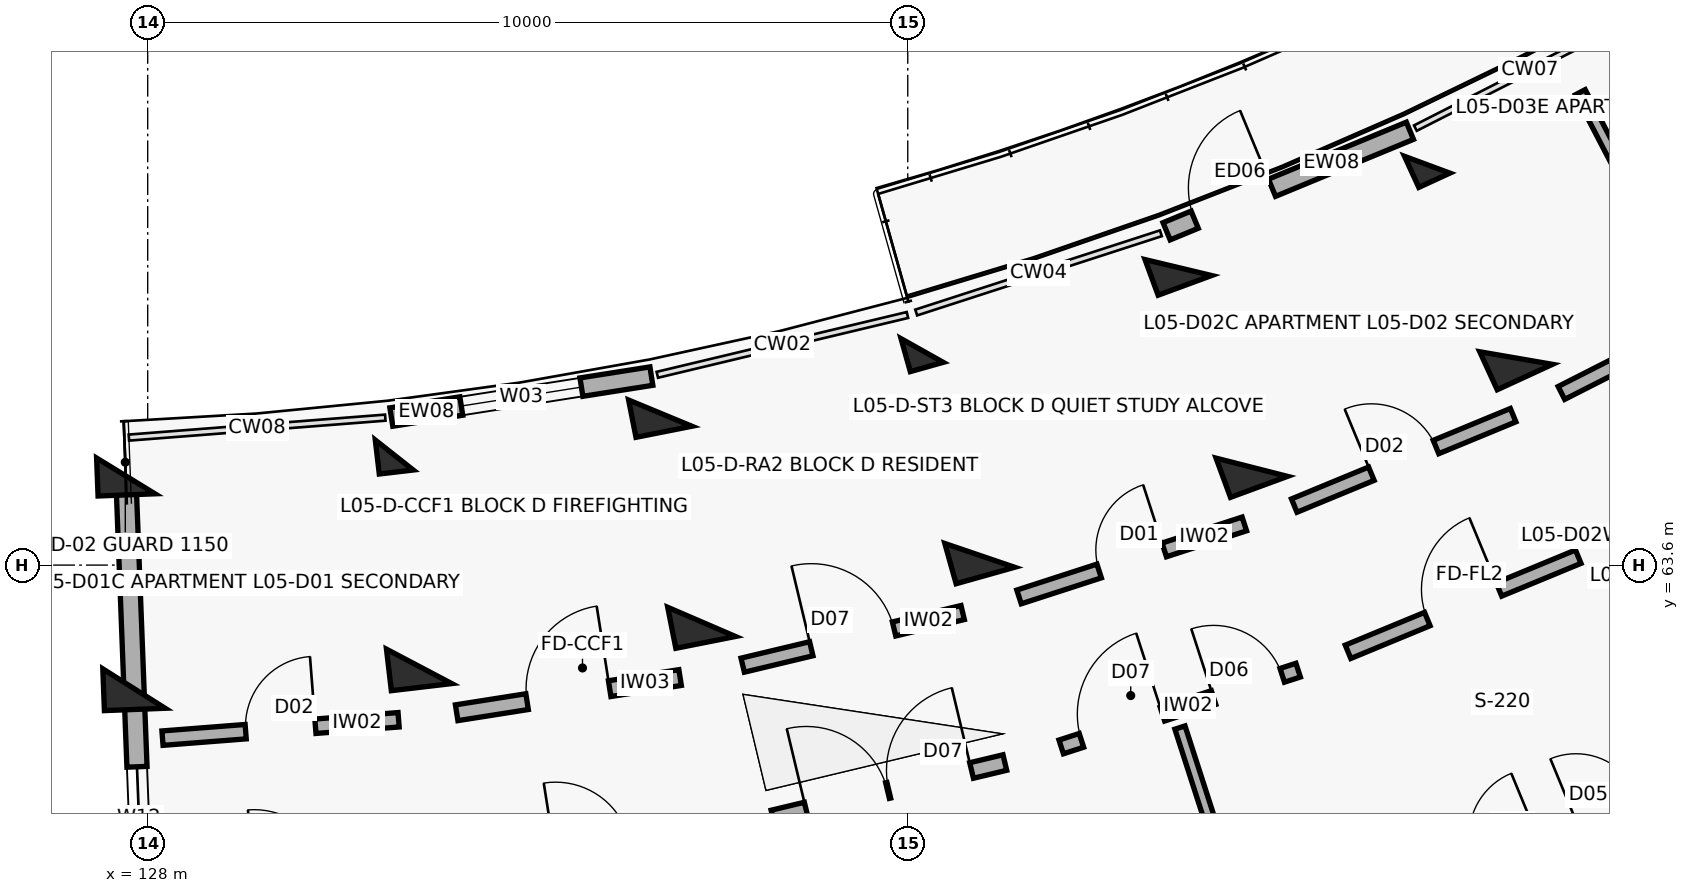
"""IFC4 building model, lengths in metres.
Left out: names, types, materials, properties, quantities, classifications, styles, units other than length and angle.
Written with IfcOpenShell. Run it as: python <this file> out.ifc"""

import sys

from ifc_helpers import new_model, si_unit, direction, frame, frame_2d, origin, origin_2d, place, context, subcontext, project, spatial, rectangle, extrude, element, fill, save


model = new_model("IFC4")
c1 = context("Model", 3, precision=1e-05, world=origin(), true_north=direction((0.0, 1.0)))
c2 = subcontext(c1, "Body", "Model", "MODEL_VIEW")
j1 = project(units=[si_unit("LENGTHUNIT", "METRE"), si_unit("PLANEANGLEUNIT", "RADIAN")], contexts=[c1])
p1 = place(None, origin())
s1 = spatial("IfcSite", under=j1, at=p1, CompositionType="ELEMENT")
p2 = place(p1, origin())
s2 = spatial("IfcBuilding", under=s1, at=p2, CompositionType="ELEMENT")
p3 = place(p2, frame((0.0, 0.0, 17.4)))
s3 = spatial("IfcBuildingStorey", under=s2, at=p3, CompositionType="ELEMENT", Elevation=17.4)
p4 = place(p3, frame((127.712, 64.773, 0.0), z_axis=(0.0, 0.0, 1.0), x_axis=(0.038387809088, -0.999262916411, 0.0)))
e1 = element("IfcColumn", 1, at=p4, inside=s3, PredefinedType="COLUMN", context=c2, shape_type="SweptSolid", body=[
    extrude(rectangle(XDim=0.5, YDim=0.75, at=origin_2d()), origin(), (0.0, 0.0, 1.0), 3.1),
])
p5 = place(p3, frame((127.82, 61.975, 0.0), z_axis=(0.0, 0.0, 1.0), x_axis=(0.038387809088, -0.999262916411, 0.0)))
e2 = element("IfcColumn", 2, at=p5, inside=s3, PredefinedType="COLUMN", context=c2, shape_type="SweptSolid", body=[
    extrude(rectangle(XDim=0.55, YDim=0.8, at=origin_2d()), origin(), (0.0, 0.0, 1.0), 3.1),
])
p6 = place(p3, frame((131.244, 65.048, 0.0), z_axis=(0.0, 0.0, 1.0), x_axis=(0.116670737099, -0.993170649538, 0.0)))
e3 = element("IfcColumn", 3, at=p6, inside=s3, PredefinedType="COLUMN", context=c2, shape_type="SweptSolid", body=[
    extrude(rectangle(XDim=0.45, YDim=0.45, at=origin_2d()), origin(), (0.0, 0.0, 1.0), 3.1),
])
p7 = place(p3, frame((131.571, 62.267, 0.0), z_axis=(0.0, 0.0, 1.0), x_axis=(0.116670737099, -0.993170649538, 0.0)))
e4 = element("IfcColumn", 4, at=p7, inside=s3, PredefinedType="COLUMN", context=c2, shape_type="SweptSolid", body=[
    extrude(rectangle(XDim=0.55, YDim=0.8, at=origin_2d()), origin(), (0.0, 0.0, 1.0), 3.1),
])
p8 = place(p3, frame((134.744, 65.599, 0.0), z_axis=(0.0, 0.0, 1.0), x_axis=(0.19423435122, -0.980955155349, 0.0)))
e5 = element("IfcColumn", 5, at=p8, inside=s3, PredefinedType="COLUMN", context=c2, shape_type="SweptSolid", body=[
    extrude(rectangle(XDim=0.5, YDim=0.75, at=origin_2d()), origin(), (0.0, 0.0, 1.0), 3.1),
])
p9 = place(p3, frame((135.288, 62.853, 0.0), z_axis=(0.0, 0.0, 1.0), x_axis=(0.19423435122, -0.980955155349, 0.0)))
e6 = element("IfcColumn", 6, at=p9, inside=s3, PredefinedType="COLUMN", context=c2, shape_type="SweptSolid", body=[
    extrude(rectangle(XDim=0.55, YDim=0.8, at=origin_2d()), origin(), (0.0, 0.0, 1.0), 3.1),
])
p10 = place(p3, frame((138.189, 66.423, 0.0), z_axis=(0.0, 0.0, 1.0), x_axis=(0.270600445976, -0.962691746426, 0.0)))
e7 = element("IfcColumn", 7, at=p10, inside=s3, PredefinedType="COLUMN", context=c2, shape_type="SweptSolid", body=[
    extrude(rectangle(XDim=0.45, YDim=0.45, at=origin_2d()), origin(), (0.0, 0.0, 1.0), 3.1),
])
p11 = place(p3, frame((138.947, 63.728, 0.0), z_axis=(0.0, 0.0, 1.0), x_axis=(0.270600445976, -0.962691746426, 0.0)))
e8 = element("IfcColumn", 8, at=p11, inside=s3, PredefinedType="COLUMN", context=c2, shape_type="SweptSolid", body=[
    extrude(rectangle(XDim=0.55, YDim=0.8, at=origin_2d()), origin(), (0.0, 0.0, 1.0), 3.1),
])
p12 = place(p3, frame((141.56, 67.515, 0.0), z_axis=(0.0, 0.0, 1.0), x_axis=(0.345298198999, -0.93849302276, 0.0)))
e9 = element("IfcColumn", 9, at=p12, inside=s3, PredefinedType="COLUMN", context=c2, shape_type="SweptSolid", body=[
    extrude(rectangle(XDim=0.5, YDim=0.75, at=origin_2d()), origin(), (0.0, 0.0, 1.0), 3.1),
])
p13 = place(p3, frame((142.527, 64.887, 0.0), z_axis=(0.0, 0.0, 1.0), x_axis=(0.345298198999, -0.93849302276, 0.0)))
e10 = element("IfcColumn", 10, at=p13, inside=s3, PredefinedType="COLUMN", context=c2, shape_type="SweptSolid", body=[
    extrude(rectangle(XDim=0.55, YDim=0.8, at=origin_2d()), origin(), (0.0, 0.0, 1.0), 3.1),
])
p14 = place(p3, frame((144.834, 68.868, 0.0), z_axis=(0.0, 0.0, 1.0), x_axis=(0.417867073801, -0.908508177527, 0.0)))
e11 = element("IfcColumn", 11, at=p14, inside=s3, PredefinedType="COLUMN", context=c2, shape_type="SweptSolid", body=[
    extrude(rectangle(XDim=0.45, YDim=0.45, at=origin_2d()), origin(), (0.0, 0.0, 1.0), 3.1),
])
p15 = place(p3, frame((146.004, 66.324, 0.0), z_axis=(0.0, 0.0, 1.0), x_axis=(0.417867073801, -0.908508177527, 0.0)))
e12 = element("IfcColumn", 12, at=p15, inside=s3, PredefinedType="COLUMN", context=c2, shape_type="SweptSolid", body=[
    extrude(rectangle(XDim=0.55, YDim=0.8, at=origin_2d()), origin(), (0.0, 0.0, 1.0), 3.1),
])
p16 = place(p3, frame((131.206, 65.548, 0.0), z_axis=(0.0, 0.0, 1.0), x_axis=(0.987825183084, 0.155568016203, 0.0)))
e13 = element("IfcWall", 13, at=p16, inside=s3, PredefinedType="SOLIDWALL", context=c2, shape_type="SweptSolid", body=[
    extrude(rectangle(XDim=3.464, YDim=0.245, at=frame_2d((1.732, 0.0))), origin(), (0.0, 0.0, 1.0), 2.25),
])
p17 = place(p16, frame((0.932, 0.0, 0.32)))
e14 = element("IfcOpeningElement", 14, at=p17, cuts=e13, PredefinedType="OPENING", context=c2, shape_type="SweptSolid", body=[
    extrude(rectangle(XDim=1.6, YDim=1.5, at=frame_2d((0.8, 0.75))), frame((0.0, 0.133, 0.0), z_axis=(0.0, -1.0, 0.0), x_axis=(1.0, 0.0, 0.0)), (0.0, 0.0, 1.0), 0.265),
])
p18 = place(p3, frame((141.406, 67.992, 0.0), z_axis=(0.0, 0.0, 1.0), x_axis=(0.924221949388, 0.381855716561, 0.0)))
e15 = element("IfcWall", 15, at=p18, inside=s3, PredefinedType="SOLIDWALL", context=c2, shape_type="SweptSolid", body=[
    extrude(rectangle(XDim=3.463, YDim=0.245, at=frame_2d((1.732, 0.0))), origin(), (0.0, 0.0, 1.0), 2.25),
])
p19 = place(p18, frame((0.4, 0.0, 0.0)))
e16 = element("IfcOpeningElement", 16, at=p19, cuts=e15, PredefinedType="OPENING", context=c2, shape_type="SweptSolid", body=[
    extrude(rectangle(XDim=1.1, YDim=2.15, at=frame_2d((0.55, 1.075))), frame((0.0, 0.133, 0.0), z_axis=(0.0, -1.0, 0.0), x_axis=(1.0, 0.0, 0.0)), (0.0, 0.0, 1.0), 0.265),
])
p20 = place(p3, frame((127.721, 64.533, 0.0), z_axis=(0.0, 0.0, 1.0), x_axis=(0.038407966241, -0.999262141847, 0.0)))
e17 = element("IfcWall", 17, at=p20, inside=s3, PredefinedType="SOLIDWALL", context=c2, shape_type="SweptSolid", body=[
    extrude(rectangle(XDim=8.2, YDim=0.265, at=frame_2d((4.1, 0.0))), origin(), (0.0, 0.0, 1.0), 2.18),
])
p21 = place(p20, frame((3.59, 0.0, 0.75)))
e18 = element("IfcOpeningElement", 18, at=p21, cuts=e17, PredefinedType="OPENING", context=c2, shape_type="SweptSolid", body=[
    extrude(rectangle(XDim=1.35, YDim=1.35, at=frame_2d((0.675, 0.675))), frame((0.0, 0.142, 0.0), z_axis=(0.0, -1.0, 0.0), x_axis=(1.0, 0.0, 0.0)), (0.0, 0.0, 1.0), 0.285),
])
p22 = place(p3, frame((128.195, 61.323, 0.0), z_axis=(0.0, 0.0, 1.0), x_axis=(0.996987280187, 0.077565218655, 0.0)))
e19 = element("IfcWall", 19, at=p22, inside=s3, PredefinedType="SOLIDWALL", context=c2, shape_type="SweptSolid", body=[
    extrude(rectangle(XDim=3.116, YDim=0.19, at=frame_2d((1.558, 0.0))), origin(), (0.0, 0.0, 1.0), 2.08),
])
p23 = place(p22, frame((1.098, 0.0, 0.0)))
e20 = element("IfcOpeningElement", 20, at=p23, cuts=e19, PredefinedType="OPENING", context=c2, shape_type="SweptSolid", body=[
    extrude(rectangle(XDim=0.92, YDim=2.1, at=frame_2d((0.46, 1.05))), frame((0.0, 0.105, 0.0), z_axis=(0.0, -1.0, 0.0), x_axis=(1.0, 0.0, 0.0)), (0.0, 0.0, 1.0), 0.21),
])
p24 = place(p3, frame((132.065, 61.657, 0.0), z_axis=(0.0, 0.0, 1.0), x_axis=(0.987816121487, 0.155625544594, 0.0)))
e21 = element("IfcWall", 21, at=p24, inside=s3, PredefinedType="SOLIDWALL", context=c2, shape_type="SweptSolid", body=[
    extrude(rectangle(XDim=2.976, YDim=0.21, at=frame_2d((1.488, 0.0))), origin(), (0.0, 0.0, 1.0), 2.08),
])
p25 = place(p24, frame((0.938, 0.0, 0.0)))
e22 = element("IfcOpeningElement", 22, at=p25, cuts=e21, PredefinedType="OPENING", context=c2, shape_type="SweptSolid", body=[
    extrude(rectangle(XDim=1.1, YDim=2.15, at=frame_2d((0.55, 1.075))), frame((0.0, 0.115, 0.0), z_axis=(0.0, -1.0, 0.0), x_axis=(1.0, 0.0, 0.0)), (0.0, 0.0, 1.0), 0.23),
])
p26 = place(p3, frame((136.227, 60.272, 0.0), z_axis=(0.0, 0.0, 1.0), x_axis=(0.972564346632, 0.232634029456, 0.0)))
e23 = element("IfcWall", 23, at=p26, inside=s3, PredefinedType="SOLIDWALL", context=c2, shape_type="SweptSolid", body=[
    extrude(rectangle(XDim=3.137, YDim=0.21, at=frame_2d((1.568, 0.0))), origin(), (0.0, 0.0, 1.0), 2.08),
])
p27 = place(p26, frame((0.45, 0.0, 0.0)))
e24 = element("IfcOpeningElement", 24, at=p27, cuts=e23, PredefinedType="OPENING", context=c2, shape_type="SweptSolid", body=[
    extrude(rectangle(XDim=1.1, YDim=2.15, at=frame_2d((0.55, 1.075))), frame((0.0, 0.115, 0.0), z_axis=(0.0, -1.0, 0.0), x_axis=(1.0, 0.0, 0.0)), (0.0, 0.0, 1.0), 0.23),
])
p28 = place(p26, frame((1.567, 0.0, 0.0)))
e25 = element("IfcOpeningElement", 25, at=p28, cuts=e23, PredefinedType="OPENING", context=c2, shape_type="SweptSolid", body=[
    extrude(rectangle(XDim=1.12, YDim=2.15, at=frame_2d((0.56, 1.075))), frame((0.0, 0.115, 0.0), z_axis=(0.0, -1.0, 0.0), x_axis=(1.0, 0.0, 0.0)), (0.0, 0.0, 1.0), 0.23),
])
p29 = place(p3, frame((135.828, 62.283, 0.0), z_axis=(0.0, 0.0, 1.0), x_axis=(0.972558314217, 0.232659247501, 0.0)))
e26 = element("IfcWall", 26, at=p29, inside=s3, PredefinedType="SOLIDWALL", context=c2, shape_type="SweptSolid", body=[
    extrude(rectangle(XDim=2.976, YDim=0.19, at=frame_2d((1.488, 0.0))), origin(), (0.0, 0.0, 1.0), 2.08),
])
p30 = place(p29, frame((0.928, 0.0, 0.0)))
e27 = element("IfcOpeningElement", 27, at=p30, cuts=e26, PredefinedType="OPENING", context=c2, shape_type="SweptSolid", body=[
    extrude(rectangle(XDim=1.12, YDim=2.15, at=frame_2d((0.56, 1.075))), frame((0.0, 0.105, 0.0), z_axis=(0.0, -1.0, 0.0), x_axis=(1.0, 0.0, 0.0)), (0.0, 0.0, 1.0), 0.21),
])
p31 = place(p3, frame((140.019, 61.208, 0.0), z_axis=(0.0, 0.0, 1.0), x_axis=(0.951323803878, 0.308193154005, 0.0)))
e28 = element("IfcWall", 28, at=p31, inside=s3, PredefinedType="SOLIDWALL", context=c2, shape_type="SweptSolid", body=[
    extrude(rectangle(XDim=3.277, YDim=0.19, at=frame_2d((1.639, 0.0))), origin(), (0.0, 0.0, 1.0), 2.08),
])
p32 = place(p31, frame((0.28, 0.0, 0.0)))
e29 = element("IfcOpeningElement", 29, at=p32, cuts=e28, PredefinedType="OPENING", context=c2, shape_type="SweptSolid", body=[
    extrude(rectangle(XDim=1.12, YDim=2.15, at=frame_2d((0.56, 1.075))), frame((0.0, 0.105, 0.0), z_axis=(0.0, -1.0, 0.0), x_axis=(1.0, 0.0, 0.0)), (0.0, 0.0, 1.0), 0.21),
])
p33 = place(p31, frame((2.107, 0.0, 0.0)))
e30 = element("IfcOpeningElement", 30, at=p33, cuts=e28, PredefinedType="OPENING", context=c2, shape_type="SweptSolid", body=[
    extrude(rectangle(XDim=0.95, YDim=2.1, at=frame_2d((0.475, 1.05))), frame((0.0, 0.105, 0.0), z_axis=(0.0, -1.0, 0.0), x_axis=(1.0, 0.0, 0.0)), (0.0, 0.0, 1.0), 0.21),
])
p34 = place(p3, frame((139.464, 63.181, 0.0), z_axis=(0.0, 0.0, 1.0), x_axis=(0.951336474448, 0.308154040027, 0.0)))
e31 = element("IfcWall", 31, at=p34, inside=s3, PredefinedType="SOLIDWALL", context=c2, shape_type="SweptSolid", body=[
    extrude(rectangle(XDim=3.116, YDim=0.19, at=frame_2d((1.558, 0.0))), origin(), (0.0, 0.0, 1.0), 2.08),
])
p35 = place(p34, frame((1.108, 0.0, 0.0)))
e32 = element("IfcOpeningElement", 32, at=p35, cuts=e31, PredefinedType="OPENING", context=c2, shape_type="SweptSolid", body=[
    extrude(rectangle(XDim=0.9, YDim=2.1, at=frame_2d((0.45, 1.05))), frame((0.0, 0.105, 0.0), z_axis=(0.0, -1.0, 0.0), x_axis=(1.0, 0.0, 0.0)), (0.0, 0.0, 1.0), 0.21),
])
p36 = place(p3, frame((141.581, 61.462, 0.0), z_axis=(0.0, 0.0, 1.0), x_axis=(0.306824216212, -0.951766200464, 0.0)))
e33 = element("IfcWall", 33, at=p36, inside=s3, PredefinedType="PARTITIONING", context=c2, shape_type="SweptSolid", body=[
    extrude(rectangle(XDim=7.95, YDim=0.14, at=frame_2d((3.975, 0.0))), origin(), (0.0, 0.0, 1.0), 2.08),
])
p37 = place(p36, frame((6.05, 0.0, 0.0)))
e34 = element("IfcOpeningElement", 34, at=p37, cuts=e33, PredefinedType="OPENING", context=c2, shape_type="SweptSolid", body=[
    extrude(rectangle(XDim=0.92, YDim=2.1, at=frame_2d((0.46, 1.05))), frame((0.0, 0.08, 0.0), z_axis=(0.0, -1.0, 0.0), x_axis=(1.0, 0.0, 0.0)), (0.0, 0.0, 1.0), 0.16),
])
p38 = place(p3, frame((143.793, 62.459, 0.0), z_axis=(0.0, 0.0, 1.0), x_axis=(0.924214561665, 0.381873596896, 0.0)))
e35 = element("IfcWall", 35, at=p38, inside=s3, PredefinedType="SOLIDWALL", context=c2, shape_type="SweptSolid", body=[
    extrude(rectangle(XDim=3.277, YDim=0.19, at=frame_2d((1.639, 0.0))), origin(), (0.0, 0.0, 1.0), 2.08),
])
p39 = place(p38, frame((1.128, 0.0, 0.0)))
e36 = element("IfcOpeningElement", 36, at=p39, cuts=e35, PredefinedType="OPENING", context=c2, shape_type="SweptSolid", body=[
    extrude(rectangle(XDim=1.02, YDim=2.15, at=frame_2d((0.51, 1.075))), frame((0.0, 0.105, 0.0), z_axis=(0.0, -1.0, 0.0), x_axis=(1.0, 0.0, 0.0)), (0.0, 0.0, 1.0), 0.21),
])
p40 = place(p3, frame((143.085, 64.383, 0.0), z_axis=(0.0, 0.0, 1.0), x_axis=(0.924213340202, 0.381876553081, 0.0)))
e37 = element("IfcWall", 37, at=p40, inside=s3, PredefinedType="SOLIDWALL", context=c2, shape_type="SweptSolid", body=[
    extrude(rectangle(XDim=3.116, YDim=0.19, at=frame_2d((1.558, 0.0))), origin(), (0.0, 0.0, 1.0), 2.08),
])
p41 = place(p40, frame((1.098, 0.0, 0.0)))
e38 = element("IfcOpeningElement", 38, at=p41, cuts=e37, PredefinedType="OPENING", context=c2, shape_type="SweptSolid", body=[
    extrude(rectangle(XDim=0.92, YDim=2.1, at=frame_2d((0.46, 1.05))), frame((0.0, 0.105, 0.0), z_axis=(0.0, -1.0, 0.0), x_axis=(1.0, 0.0, 0.0)), (0.0, 0.0, 1.0), 0.21),
])
p42 = place(p3, frame((144.852, 59.437, 0.0), z_axis=(0.0, 0.0, 1.0), x_axis=(0.924217547919, 0.381866369453, 0.0)))
e39 = element("IfcWall", 39, at=p42, inside=s3, PredefinedType="PARTITIONING", context=c2, shape_type="SweptSolid", body=[
    extrude(rectangle(XDim=3.628, YDim=0.1, at=frame_2d((1.814, 0.0))), origin(), (0.0, 0.0, 1.0), 2.08),
])
p43 = place(p42, frame((0.65, 0.0, 0.0)))
e40 = element("IfcOpeningElement", 40, at=p43, cuts=e39, PredefinedType="OPENING", context=c2, shape_type="SweptSolid", body=[
    extrude(rectangle(XDim=0.9, YDim=2.1, at=frame_2d((0.45, 1.05))), frame((0.0, 0.06, 0.0), z_axis=(0.0, -1.0, 0.0), x_axis=(1.0, 0.0, 0.0)), (0.0, 0.0, 1.0), 0.12),
])
p44 = place(p42, frame((2.098, 0.0, 0.0)))
e41 = element("IfcOpeningElement", 41, at=p44, cuts=e39, PredefinedType="OPENING", context=c2, shape_type="SweptSolid", body=[
    extrude(rectangle(XDim=0.88, YDim=2.1, at=frame_2d((0.44, 1.05))), frame((0.0, 0.06, 0.0), z_axis=(0.0, -1.0, 0.0), x_axis=(1.0, 0.0, 0.0)), (0.0, 0.0, 1.0), 0.12),
])
p45 = place(p3, frame((146.6, 65.865, 0.0), z_axis=(0.0, 0.0, 1.0), x_axis=(0.891414101388, 0.453189695212, 0.0)))
e42 = element("IfcWall", 42, at=p45, inside=s3, PredefinedType="SOLIDWALL", context=c2, shape_type="SweptSolid", body=[
    extrude(rectangle(XDim=3.116, YDim=0.19, at=frame_2d((1.558, 0.0))), origin(), (0.0, 0.0, 1.0), 2.08),
])
p46 = place(p45, frame((1.088, 0.0, 0.0)))
e43 = element("IfcOpeningElement", 43, at=p46, cuts=e42, PredefinedType="OPENING", context=c2, shape_type="SweptSolid", body=[
    extrude(rectangle(XDim=0.94, YDim=2.1, at=frame_2d((0.47, 1.05))), frame((0.0, 0.105, 0.0), z_axis=(0.0, -1.0, 0.0), x_axis=(1.0, 0.0, 0.0)), (0.0, 0.0, 1.0), 0.21),
])
p47 = place(p3, frame((146.849, 69.822, 0.0), z_axis=(0.0, 0.0, 1.0), x_axis=(0.462242343884, -0.886753638572, 0.0)))
e44 = element("IfcWall", 44, at=p47, inside=s3, PredefinedType="PARTITIONING", context=c2, shape_type="SweptSolid", body=[
    extrude(rectangle(XDim=3.3, YDim=0.145, at=frame_2d((1.65, 0.0))), origin(), (0.0, 0.0, 1.0), 2.08),
])
p48 = place(p47, frame((1.21, 0.0, 0.0)))
e45 = element("IfcOpeningElement", 45, at=p48, cuts=e44, PredefinedType="OPENING", context=c2, shape_type="SweptSolid", body=[
    extrude(rectangle(XDim=0.88, YDim=2.1, at=frame_2d((0.44, 1.05))), frame((0.0, 0.083, 0.0), z_axis=(0.0, -1.0, 0.0), x_axis=(1.0, 0.0, 0.0)), (0.0, 0.0, 1.0), 0.165),
])
p49 = place(p17, origin())
e46 = element("IfcWindow", 46, at=p49, inside=s3, PartitioningType="DOUBLE_PANEL_VERTICAL", PredefinedType="WINDOW", context=c2, shape_type="SweptSolid", body=[
    extrude(rectangle(XDim=1.6, YDim=1.5, at=frame_2d((0.8, 0.75))), frame((0.0, 0.03, 0.0), z_axis=(0.0, -1.0, 0.0), x_axis=(1.0, 0.0, 0.0)), (0.0, 0.0, 1.0), 0.06),
])
fill(e14, e46)
p50 = place(p19, origin())
e47 = element("IfcDoor", 47, at=p50, inside=s3, OperationType="SINGLE_SWING_RIGHT", PredefinedType="DOOR", context=c2, shape_type="SweptSolid", body=[
    extrude(rectangle(XDim=1.1, YDim=2.15, at=frame_2d((0.55, 1.075))), frame((0.0, 0.025, 0.0), z_axis=(0.0, -1.0, 0.0), x_axis=(1.0, 0.0, 0.0)), (0.0, 0.0, 1.0), 0.05),
])
fill(e16, e47)
p51 = place(p21, origin())
e48 = element("IfcWindow", 48, at=p51, inside=s3, PartitioningType="DOUBLE_PANEL_VERTICAL", PredefinedType="WINDOW", context=c2, shape_type="SweptSolid", body=[
    extrude(rectangle(XDim=1.35, YDim=1.35, at=frame_2d((0.675, 0.675))), frame((0.0, 0.03, 0.0), z_axis=(0.0, -1.0, 0.0), x_axis=(1.0, 0.0, 0.0)), (0.0, 0.0, 1.0), 0.06),
])
fill(e18, e48)
p52 = place(p23, origin())
e49 = element("IfcDoor", 49, at=p52, inside=s3, OperationType="SINGLE_SWING_RIGHT", PredefinedType="DOOR", context=c2, shape_type="SweptSolid", body=[
    extrude(rectangle(XDim=0.92, YDim=2.1, at=frame_2d((0.46, 1.05))), frame((0.0, 0.025, 0.0), z_axis=(0.0, -1.0, 0.0), x_axis=(1.0, 0.0, 0.0)), (0.0, 0.0, 1.0), 0.05),
])
fill(e20, e49)
p53 = place(p25, origin())
e50 = element("IfcDoor", 50, at=p53, inside=s3, OperationType="SINGLE_SWING_RIGHT", PredefinedType="DOOR", context=c2, shape_type="SweptSolid", body=[
    extrude(rectangle(XDim=1.1, YDim=2.15, at=frame_2d((0.55, 1.075))), frame((0.0, 0.025, 0.0), z_axis=(0.0, -1.0, 0.0), x_axis=(1.0, 0.0, 0.0)), (0.0, 0.0, 1.0), 0.05),
])
fill(e22, e50)
p54 = place(p27, origin())
e51 = element("IfcDoor", 51, at=p54, inside=s3, OperationType="SINGLE_SWING_LEFT", PredefinedType="DOOR", context=c2, shape_type="SweptSolid", body=[
    extrude(rectangle(XDim=1.1, YDim=2.15, at=frame_2d((0.55, 1.075))), frame((0.0, 0.025, 0.0), z_axis=(0.0, -1.0, 0.0), x_axis=(1.0, 0.0, 0.0)), (0.0, 0.0, 1.0), 0.05),
])
fill(e24, e51)
p55 = place(p28, origin())
e52 = element("IfcDoor", 52, at=p55, inside=s3, OperationType="SINGLE_SWING_RIGHT", PredefinedType="DOOR", context=c2, shape_type="SweptSolid", body=[
    extrude(rectangle(XDim=1.12, YDim=2.15, at=frame_2d((0.56, 1.075))), frame((0.0, 0.025, 0.0), z_axis=(0.0, -1.0, 0.0), x_axis=(1.0, 0.0, 0.0)), (0.0, 0.0, 1.0), 0.05),
])
fill(e25, e52)
p56 = place(p30, origin())
e53 = element("IfcDoor", 53, at=p56, inside=s3, OperationType="SINGLE_SWING_LEFT", PredefinedType="DOOR", context=c2, shape_type="SweptSolid", body=[
    extrude(rectangle(XDim=1.12, YDim=2.15, at=frame_2d((0.56, 1.075))), frame((0.0, 0.025, 0.0), z_axis=(0.0, -1.0, 0.0), x_axis=(1.0, 0.0, 0.0)), (0.0, 0.0, 1.0), 0.05),
])
fill(e27, e53)
p57 = place(p32, origin())
e54 = element("IfcDoor", 54, at=p57, inside=s3, OperationType="SINGLE_SWING_RIGHT", PredefinedType="DOOR", context=c2, shape_type="SweptSolid", body=[
    extrude(rectangle(XDim=1.12, YDim=2.15, at=frame_2d((0.56, 1.075))), frame((0.0, 0.025, 0.0), z_axis=(0.0, -1.0, 0.0), x_axis=(1.0, 0.0, 0.0)), (0.0, 0.0, 1.0), 0.05),
])
fill(e29, e54)
p58 = place(p33, origin())
e55 = element("IfcDoor", 55, at=p58, inside=s3, OperationType="SINGLE_SWING_LEFT", PredefinedType="DOOR", context=c2, shape_type="SweptSolid", body=[
    extrude(rectangle(XDim=0.95, YDim=2.1, at=frame_2d((0.475, 1.05))), frame((0.0, 0.025, 0.0), z_axis=(0.0, -1.0, 0.0), x_axis=(1.0, 0.0, 0.0)), (0.0, 0.0, 1.0), 0.05),
])
fill(e30, e55)
p59 = place(p35, origin())
e56 = element("IfcDoor", 56, at=p59, inside=s3, OperationType="SINGLE_SWING_RIGHT", PredefinedType="DOOR", context=c2, shape_type="SweptSolid", body=[
    extrude(rectangle(XDim=0.9, YDim=2.1, at=frame_2d((0.45, 1.05))), frame((0.0, 0.025, 0.0), z_axis=(0.0, -1.0, 0.0), x_axis=(1.0, 0.0, 0.0)), (0.0, 0.0, 1.0), 0.05),
])
fill(e32, e56)
p60 = place(p39, origin())
e57 = element("IfcDoor", 57, at=p60, inside=s3, OperationType="SINGLE_SWING_RIGHT", PredefinedType="DOOR", context=c2, shape_type="SweptSolid", body=[
    extrude(rectangle(XDim=1.02, YDim=2.15, at=frame_2d((0.51, 1.075))), frame((0.0, 0.025, 0.0), z_axis=(0.0, -1.0, 0.0), x_axis=(1.0, 0.0, 0.0)), (0.0, 0.0, 1.0), 0.05),
])
fill(e36, e57)
p61 = place(p41, origin())
e58 = element("IfcDoor", 58, at=p61, inside=s3, OperationType="SINGLE_SWING_LEFT", PredefinedType="DOOR", context=c2, shape_type="SweptSolid", body=[
    extrude(rectangle(XDim=0.92, YDim=2.1, at=frame_2d((0.46, 1.05))), frame((0.0, 0.025, 0.0), z_axis=(0.0, -1.0, 0.0), x_axis=(1.0, 0.0, 0.0)), (0.0, 0.0, 1.0), 0.05),
])
fill(e38, e58)
p62 = place(p44, origin())
e59 = element("IfcDoor", 59, at=p62, inside=s3, OperationType="SINGLE_SWING_LEFT", PredefinedType="DOOR", context=c2, shape_type="SweptSolid", body=[
    extrude(rectangle(XDim=0.88, YDim=2.1, at=frame_2d((0.44, 1.05))), frame((0.0, 0.025, 0.0), z_axis=(0.0, -1.0, 0.0), x_axis=(1.0, 0.0, 0.0)), (0.0, 0.0, 1.0), 0.05),
])
fill(e41, e59)
save(model, sys.argv[1])
